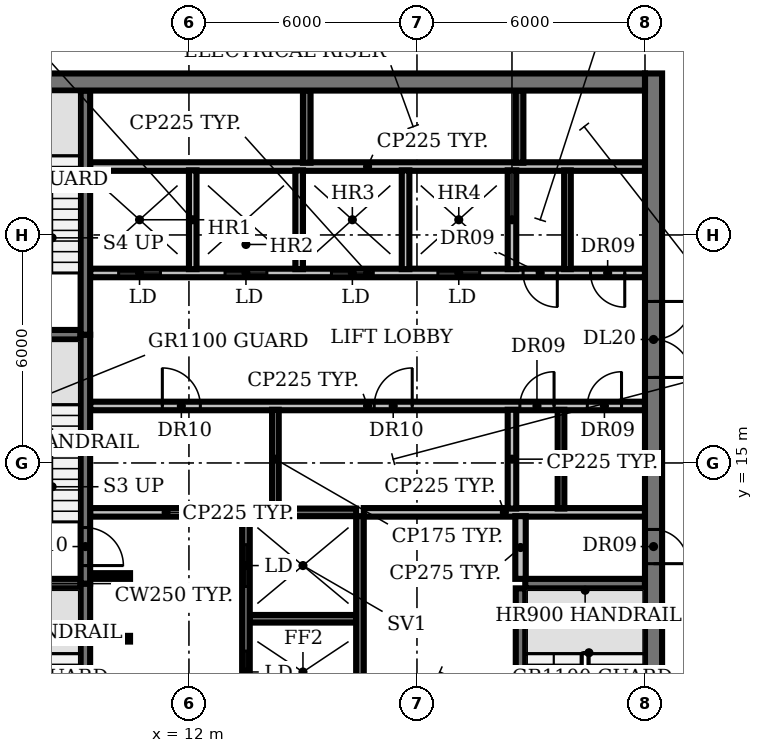
"""IFC4 building model, lengths in metres.
Left out: names, types, materials, properties, quantities, classifications, styles, units other than length and angle.
Written with IfcOpenShell. Run it as: python <this file> out.ifc"""

import sys

from ifc_helpers import new_model, si_unit, direction, frame, frame_2d, origin, place, context, subcontext, project, spatial, rectangle, extrude, element, fill, save


model = new_model("IFC4")
c1 = context("Model", 3, precision=1e-05, world=origin(), true_north=direction((0.0, 1.0)))
c2 = subcontext(c1, "Body", "Model", "MODEL_VIEW")
j1 = project(units=[si_unit("LENGTHUNIT", "METRE"), si_unit("PLANEANGLEUNIT", "RADIAN")], contexts=[c1])
p1 = place(None, origin())
s1 = spatial("IfcSite", under=j1, at=p1, CompositionType="ELEMENT")
p2 = place(p1, origin())
s2 = spatial("IfcBuilding", under=s1, at=p2, CompositionType="ELEMENT")
p3 = place(p2, frame((0.0, 0.0, 222.2)))
s3 = spatial("IfcBuildingStorey", under=s2, at=p3, CompositionType="ELEMENT", Elevation=222.2)
p4 = place(p3, frame((9.4, 10.375, 0.0), z_axis=(0.0, 0.0, 1.0), x_axis=(1.0, 0.0, 0.0)))
e1 = element("IfcWall", 1, at=p4, inside=s3, PredefinedType="SHEAR", context=c2, shape_type="SweptSolid", body=[
    extrude(rectangle(XDim=1.05, YDim=0.15, at=frame_2d((0.525, 0.0))), origin(), (0.0, 0.0, 1.0), 3.85),
])
p5 = place(p3, frame((13.6, 10.9, 0.0), z_axis=(0.0, 0.0, 1.0), x_axis=(1.0, 0.0, 0.0)))
e2 = element("IfcWall", 2, at=p5, inside=s3, PredefinedType="SHEAR", context=c2, shape_type="SweptSolid", body=[
    extrude(rectangle(XDim=2.8, YDim=0.2, at=frame_2d((1.4, 0.0))), origin(), (0.0, 0.0, 1.0), 3.85),
])
for number, where, z_axis, x_axis in (
    (3, (6.0, 11.825, 0.0), (0.0, 0.0, 1.0), (1.0, 0.0, 0.0)),
    (4, (20.85, 11.825, 0.0), (0.0, 0.0, 1.0), (1.0, 0.0, 0.0)),
):
    element("IfcWall", number, at=place(p3, frame(where, z_axis=z_axis, x_axis=x_axis)), inside=s3, PredefinedType="SHEAR", context=c2, shape_type="SweptSolid", body=[
        extrude(rectangle(XDim=3.15, YDim=0.25, at=frame_2d((1.575, 0.0))), origin(), (0.0, 0.0, 1.0), 3.85),
    ])
p6 = place(p3, frame((9.4, 12.025, 0.0), z_axis=(0.0, 0.0, 1.0), x_axis=(1.0, 0.0, 0.0)))
e5 = element("IfcWall", 5, at=p6, inside=s3, PredefinedType="SHEAR", context=c2, shape_type="SweptSolid", body=[
    extrude(rectangle(XDim=1.05, YDim=0.15, at=frame_2d((0.525, 0.0))), origin(), (0.0, 0.0, 1.0), 3.85),
])
p7 = place(p3, frame((9.4, 13.7, 0.0), z_axis=(0.0, 0.0, 1.0), x_axis=(1.0, 0.0, 0.0)))
e6 = element("IfcWall", 6, at=p7, inside=s3, PredefinedType="PARTITIONING", context=c2, shape_type="SweptSolid", body=[
    extrude(rectangle(XDim=4.0, YDim=0.225, at=frame_2d((2.0, 0.0))), origin(), (0.0, 0.0, 1.0), 3.85),
])
p8 = place(p3, frame((13.6, 13.7, 0.0), z_axis=(0.0, 0.0, 1.0), x_axis=(1.0, 0.0, 0.0)))
e7 = element("IfcWall", 7, at=p8, inside=s3, PredefinedType="SHEAR", context=c2, shape_type="SweptSolid", body=[
    extrude(rectangle(XDim=2.8, YDim=0.2, at=frame_2d((1.4, 0.0))), origin(), (0.0, 0.0, 1.0), 3.85),
])
p9 = place(p3, frame((16.6, 13.7, 0.0), z_axis=(0.0, 0.0, 1.0), x_axis=(1.0, 0.0, 0.0)))
e8 = element("IfcWall", 8, at=p9, inside=s3, PredefinedType="PARTITIONING", context=c2, shape_type="SweptSolid", body=[
    extrude(rectangle(XDim=7.4, YDim=0.225, at=frame_2d((3.7, 0.0))), origin(), (0.0, 0.0, 1.0), 3.85),
])
p10 = place(p3, frame((9.4, 16.5, 0.0), z_axis=(0.0, 0.0, 1.0), x_axis=(1.0, 0.0, 0.0)))
e9 = element("IfcWall", 9, at=p10, inside=s3, PredefinedType="PARTITIONING", context=c2, shape_type="SweptSolid", body=[
    extrude(rectangle(XDim=14.6, YDim=0.225, at=frame_2d((7.3, 0.0))), origin(), (0.0, 0.0, 1.0), 3.85),
])
p11 = place(p10, frame((1.9, 0.0, 0.0)))
e10 = element("IfcOpeningElement", 10, at=p11, cuts=e9, PredefinedType="OPENING", context=c2, shape_type="SweptSolid", body=[
    extrude(rectangle(XDim=1.0, YDim=2.1, at=frame_2d((0.5, 1.05))), frame((0.0, 0.123, 0.0), z_axis=(0.0, -1.0, 0.0), x_axis=(1.0, 0.0, 0.0)), (0.0, 0.0, 1.0), 0.245),
])
p12 = place(p10, frame((7.475, 0.0, 0.0)))
e11 = element("IfcOpeningElement", 11, at=p12, cuts=e9, PredefinedType="OPENING", context=c2, shape_type="SweptSolid", body=[
    extrude(rectangle(XDim=1.0, YDim=2.1, at=frame_2d((0.5, 1.05))), frame((0.0, 0.123, 0.0), z_axis=(0.0, -1.0, 0.0), x_axis=(1.0, 0.0, 0.0)), (0.0, 0.0, 1.0), 0.245),
])
p13 = place(p10, frame((11.308, 0.0, 0.0)))
e12 = element("IfcOpeningElement", 12, at=p13, cuts=e9, PredefinedType="OPENING", context=c2, shape_type="SweptSolid", body=[
    extrude(rectangle(XDim=0.9, YDim=2.1, at=frame_2d((0.45, 1.05))), frame((0.0, 0.123, 0.0), z_axis=(0.0, -1.0, 0.0), x_axis=(1.0, 0.0, 0.0)), (0.0, 0.0, 1.0), 0.245),
])
p14 = place(p10, frame((13.083, 0.0, 0.0)))
e13 = element("IfcOpeningElement", 13, at=p14, cuts=e9, PredefinedType="OPENING", context=c2, shape_type="SweptSolid", body=[
    extrude(rectangle(XDim=0.9, YDim=2.1, at=frame_2d((0.45, 1.05))), frame((0.0, 0.123, 0.0), z_axis=(0.0, -1.0, 0.0), x_axis=(1.0, 0.0, 0.0)), (0.0, 0.0, 1.0), 0.245),
])
p15 = place(p3, frame((6.0, 18.375, 0.0), z_axis=(0.0, 0.0, 1.0), x_axis=(1.0, 0.0, 0.0)))
e14 = element("IfcWall", 14, at=p15, inside=s3, PredefinedType="SHEAR", context=c2, shape_type="SweptSolid", body=[
    extrude(rectangle(XDim=3.15, YDim=0.25, at=frame_2d((1.575, 0.0))), origin(), (0.0, 0.0, 1.0), 3.85),
])
p16 = place(p3, frame((24.0, 20.0, 0.0), z_axis=(0.0, 0.0, 1.0), x_axis=(-1.0, 0.0, 0.0)))
e15 = element("IfcWall", 15, at=p16, inside=s3, PredefinedType="PARTITIONING", context=c2, shape_type="SweptSolid", body=[
    extrude(rectangle(XDim=14.6, YDim=0.225, at=frame_2d((7.3, 0.0))), origin(), (0.0, 0.0, 1.0), 3.85),
])
p17 = place(p16, frame((12.75, 0.0, 0.0)))
e16 = element("IfcOpeningElement", 16, at=p17, cuts=e15, PredefinedType="OPENING", context=c2, shape_type="SweptSolid", body=[
    extrude(rectangle(XDim=1.1, YDim=2.1, at=frame_2d((0.55, 1.05))), frame((0.0, 0.123, 0.0), z_axis=(0.0, -1.0, 0.0), x_axis=(1.0, 0.0, 0.0)), (0.0, 0.0, 1.0), 0.245),
])
p18 = place(p16, frame((9.95, 0.0, 0.0)))
e17 = element("IfcOpeningElement", 17, at=p18, cuts=e15, PredefinedType="OPENING", context=c2, shape_type="SweptSolid", body=[
    extrude(rectangle(XDim=1.1, YDim=2.1, at=frame_2d((0.55, 1.05))), frame((0.0, 0.123, 0.0), z_axis=(0.0, -1.0, 0.0), x_axis=(1.0, 0.0, 0.0)), (0.0, 0.0, 1.0), 0.245),
])
p19 = place(p16, frame((7.15, 0.0, 0.0)))
e18 = element("IfcOpeningElement", 18, at=p19, cuts=e15, PredefinedType="OPENING", context=c2, shape_type="SweptSolid", body=[
    extrude(rectangle(XDim=1.1, YDim=2.1, at=frame_2d((0.55, 1.05))), frame((0.0, 0.123, 0.0), z_axis=(0.0, -1.0, 0.0), x_axis=(1.0, 0.0, 0.0)), (0.0, 0.0, 1.0), 0.245),
])
p20 = place(p16, frame((4.35, 0.0, 0.0)))
e19 = element("IfcOpeningElement", 19, at=p20, cuts=e15, PredefinedType="OPENING", context=c2, shape_type="SweptSolid", body=[
    extrude(rectangle(XDim=1.1, YDim=2.1, at=frame_2d((0.55, 1.05))), frame((0.0, 0.123, 0.0), z_axis=(0.0, -1.0, 0.0), x_axis=(1.0, 0.0, 0.0)), (0.0, 0.0, 1.0), 0.245),
])
p21 = place(p16, frame((2.308, 0.0, 0.0)))
e20 = element("IfcOpeningElement", 20, at=p21, cuts=e15, PredefinedType="OPENING", context=c2, shape_type="SweptSolid", body=[
    extrude(rectangle(XDim=0.9, YDim=2.1, at=frame_2d((0.45, 1.05))), frame((0.0, 0.123, 0.0), z_axis=(0.0, -1.0, 0.0), x_axis=(1.0, 0.0, 0.0)), (0.0, 0.0, 1.0), 0.245),
])
p22 = place(p16, frame((0.532, 0.0, 0.0)))
e21 = element("IfcOpeningElement", 21, at=p22, cuts=e15, PredefinedType="OPENING", context=c2, shape_type="SweptSolid", body=[
    extrude(rectangle(XDim=0.9, YDim=2.1, at=frame_2d((0.45, 1.05))), frame((0.0, 0.123, 0.0), z_axis=(0.0, -1.0, 0.0), x_axis=(1.0, 0.0, 0.0)), (0.0, 0.0, 1.0), 0.245),
])
p23 = place(p3, frame((9.4, 22.8, 0.0), z_axis=(0.0, 0.0, 1.0), x_axis=(1.0, 0.0, 0.0)))
e22 = element("IfcWall", 22, at=p23, inside=s3, PredefinedType="PARTITIONING", context=c2, shape_type="SweptSolid", body=[
    extrude(rectangle(XDim=14.6, YDim=0.225, at=frame_2d((7.3, 0.0))), origin(), (0.0, 0.0, 1.0), 3.85),
])
p24 = place(p3, frame((9.275, 11.825, 0.0), z_axis=(0.0, 0.0, 1.0), x_axis=(0.0, -1.0, 0.0)))
e23 = element("IfcWall", 23, at=p24, inside=s3, PredefinedType="SHEAR", context=c2, shape_type="SweptSolid", body=[
    extrude(rectangle(XDim=6.425, YDim=0.25, at=frame_2d((3.212, 0.0))), origin(), (0.0, 0.0, 1.0), 3.85),
])
p25 = place(p24, frame((5.075, 0.0, 0.0)))
e24 = element("IfcOpeningElement", 24, at=p25, cuts=e23, PredefinedType="OPENING", context=c2, shape_type="SweptSolid", body=[
    extrude(rectangle(XDim=1.0, YDim=2.1, at=frame_2d((0.5, 1.05))), frame((0.0, 0.135, 0.0), z_axis=(0.0, -1.0, 0.0), x_axis=(1.0, 0.0, 0.0)), (0.0, 0.0, 1.0), 0.27),
])
p26 = place(p3, frame((9.275, 18.375, 0.0), z_axis=(0.0, 0.0, 1.0), x_axis=(0.0, -1.0, 0.0)))
e25 = element("IfcWall", 25, at=p26, inside=s3, PredefinedType="SHEAR", context=c2, shape_type="SweptSolid", body=[
    extrude(rectangle(XDim=6.55, YDim=0.25, at=frame_2d((3.275, 0.0))), origin(), (0.0, 0.0, 1.0), 3.85),
])
p27 = place(p26, frame((5.075, 0.0, 0.0)))
e26 = element("IfcOpeningElement", 26, at=p27, cuts=e25, PredefinedType="OPENING", context=c2, shape_type="SweptSolid", body=[
    extrude(rectangle(XDim=1.0, YDim=2.1, at=frame_2d((0.5, 1.05))), frame((0.0, 0.135, 0.0), z_axis=(0.0, -1.0, 0.0), x_axis=(1.0, 0.0, 0.0)), (0.0, 0.0, 1.0), 0.27),
])
p28 = place(p3, frame((9.275, 18.375, 0.0), z_axis=(0.0, 0.0, 1.0), x_axis=(0.0, 1.0, 0.0)))
e27 = element("IfcWall", 27, at=p28, inside=s3, PredefinedType="SHEAR", context=c2, shape_type="SweptSolid", body=[
    extrude(rectangle(XDim=6.425, YDim=0.25, at=frame_2d((3.212, 0.0))), origin(), (0.0, 0.0, 1.0), 3.85),
])
p29 = place(p3, frame((12.1, 20.1, 0.0), z_axis=(0.0, 0.0, 1.0), x_axis=(0.0, 1.0, 0.0)))
e28 = element("IfcWall", 28, at=p29, inside=s3, PredefinedType="SOLIDWALL", context=c2, shape_type="SweptSolid", body=[
    extrude(rectangle(XDim=2.6, YDim=0.2, at=frame_2d((1.3, 0.0))), origin(), (0.0, 0.0, 1.0), 3.85),
])
p30 = place(p3, frame((13.5, 5.4, 0.0), z_axis=(0.0, 0.0, 1.0), x_axis=(0.0, 1.0, 0.0)))
e29 = element("IfcWall", 29, at=p30, inside=s3, PredefinedType="SHEAR", context=c2, shape_type="SweptSolid", body=[
    extrude(rectangle(XDim=8.2, YDim=0.2, at=frame_2d((4.1, 0.0))), origin(), (0.0, 0.0, 1.0), 3.85),
])
p31 = place(p30, frame((0.75, 0.0, 0.0)))
e30 = element("IfcOpeningElement", 30, at=p31, cuts=e29, PredefinedType="OPENING", context=c2, shape_type="SweptSolid", body=[
    extrude(rectangle(XDim=1.1, YDim=2.1, at=frame_2d((0.55, 1.05))), frame((0.0, 0.11, 0.0), z_axis=(0.0, -1.0, 0.0), x_axis=(1.0, 0.0, 0.0)), (0.0, 0.0, 1.0), 0.22),
])
p32 = place(p30, frame((3.55, 0.0, 0.0)))
e31 = element("IfcOpeningElement", 31, at=p32, cuts=e29, PredefinedType="OPENING", context=c2, shape_type="SweptSolid", body=[
    extrude(rectangle(XDim=1.1, YDim=2.1, at=frame_2d((0.55, 1.05))), frame((0.0, 0.11, 0.0), z_axis=(0.0, -1.0, 0.0), x_axis=(1.0, 0.0, 0.0)), (0.0, 0.0, 1.0), 0.22),
])
p33 = place(p30, frame((6.35, 0.0, 0.0)))
e32 = element("IfcOpeningElement", 32, at=p33, cuts=e29, PredefinedType="OPENING", context=c2, shape_type="SweptSolid", body=[
    extrude(rectangle(XDim=1.1, YDim=2.1, at=frame_2d((0.55, 1.05))), frame((0.0, 0.11, 0.0), z_axis=(0.0, -1.0, 0.0), x_axis=(1.0, 0.0, 0.0)), (0.0, 0.0, 1.0), 0.22),
])
p34 = place(p3, frame((14.275, 13.8, 0.0), z_axis=(0.0, 0.0, 1.0), x_axis=(0.0, 1.0, 0.0)))
e33 = element("IfcWall", 33, at=p34, inside=s3, PredefinedType="PARTITIONING", context=c2, shape_type="SweptSolid", body=[
    extrude(rectangle(XDim=2.6, YDim=0.175, at=frame_2d((1.3, 0.0))), origin(), (0.0, 0.0, 1.0), 3.85),
])
p35 = place(p3, frame((14.9, 20.1, 0.0), z_axis=(0.0, 0.0, 1.0), x_axis=(0.0, 1.0, 0.0)))
e34 = element("IfcWall", 34, at=p35, inside=s3, PredefinedType="SOLIDWALL", context=c2, shape_type="SweptSolid", body=[
    extrude(rectangle(XDim=2.6, YDim=0.2, at=frame_2d((1.3, 0.0))), origin(), (0.0, 0.0, 1.0), 3.85),
])
p36 = place(p3, frame((15.1, 22.9, 0.0), z_axis=(0.0, 0.0, 1.0), x_axis=(0.0, 1.0, 0.0)))
e35 = element("IfcWall", 35, at=p36, inside=s3, PredefinedType="SHEAR", context=c2, shape_type="SweptSolid", body=[
    extrude(rectangle(XDim=1.9, YDim=0.2, at=frame_2d((0.95, 0.0))), origin(), (0.0, 0.0, 1.0), 3.85),
])
p37 = place(p3, frame((16.5, 5.4, 0.0), z_axis=(0.0, 0.0, 1.0), x_axis=(0.0, 1.0, 0.0)))
e36 = element("IfcWall", 36, at=p37, inside=s3, PredefinedType="SHEAR", context=c2, shape_type="SweptSolid", body=[
    extrude(rectangle(XDim=8.2, YDim=0.2, at=frame_2d((4.1, 0.0))), origin(), (0.0, 0.0, 1.0), 3.85),
])
p38 = place(p3, frame((17.7, 20.1, 0.0), z_axis=(0.0, 0.0, 1.0), x_axis=(0.0, 1.0, 0.0)))
e37 = element("IfcWall", 37, at=p38, inside=s3, PredefinedType="SOLIDWALL", context=c2, shape_type="SweptSolid", body=[
    extrude(rectangle(XDim=2.6, YDim=0.2, at=frame_2d((1.3, 0.0))), origin(), (0.0, 0.0, 1.0), 3.85),
])
for number, where, z_axis, x_axis in (
    (38, (20.5, 13.8, 0.0), (0.0, 0.0, 1.0), (0.0, 1.0, 0.0)),
    (39, (20.5, 20.1, 0.0), (0.0, 0.0, 1.0), (0.0, 1.0, 0.0)),
):
    element("IfcWall", number, at=place(p3, frame(where, z_axis=z_axis, x_axis=x_axis)), inside=s3, PredefinedType="PARTITIONING", context=c2, shape_type="SweptSolid", body=[
        extrude(rectangle(XDim=2.6, YDim=0.225, at=frame_2d((1.3, 0.0))), origin(), (0.0, 0.0, 1.0), 3.85),
    ])
p39 = place(p3, frame((20.7, 22.9, 0.0), z_axis=(0.0, 0.0, 1.0), x_axis=(0.0, 1.0, 0.0)))
e40 = element("IfcWall", 40, at=p39, inside=s3, PredefinedType="SHEAR", context=c2, shape_type="SweptSolid", body=[
    extrude(rectangle(XDim=1.9, YDim=0.2, at=frame_2d((0.95, 0.0))), origin(), (0.0, 0.0, 1.0), 3.85),
])
p40 = place(p3, frame((20.725, 5.4, 0.0), z_axis=(0.0, 0.0, 1.0), x_axis=(0.0, 1.0, 0.0)))
e41 = element("IfcWall", 41, at=p40, inside=s3, PredefinedType="SHEAR", context=c2, shape_type="SweptSolid", body=[
    extrude(rectangle(XDim=6.3, YDim=0.25, at=frame_2d((3.15, 0.0))), origin(), (0.0, 0.0, 1.0), 3.85),
])
p41 = place(p3, frame((20.725, 11.95, 0.0), z_axis=(0.0, 0.0, 1.0), x_axis=(0.0, 1.0, 0.0)))
e42 = element("IfcWall", 42, at=p41, inside=s3, PredefinedType="PARTITIONING", context=c2, shape_type="SweptSolid", body=[
    extrude(rectangle(XDim=1.65, YDim=0.275, at=frame_2d((0.825, 0.0))), origin(), (0.0, 0.0, 1.0), 3.85),
])
for number, where, z_axis, x_axis in (
    (43, (21.79, 13.8, 0.0), (0.0, 0.0, 1.0), (0.0, 1.0, 0.0)),
    (44, (21.96, 20.1, 0.0), (0.0, 0.0, 1.0), (0.0, 1.0, 0.0)),
):
    element("IfcWall", number, at=place(p3, frame(where, z_axis=z_axis, x_axis=x_axis)), inside=s3, PredefinedType="PARTITIONING", context=c2, shape_type="SweptSolid", body=[
        extrude(rectangle(XDim=2.6, YDim=0.175, at=frame_2d((1.3, 0.0))), origin(), (0.0, 0.0, 1.0), 3.85),
    ])
p42 = place(p3, frame((24.225, 25.25, 0.0), z_axis=(0.0, 0.0, 1.0), x_axis=(0.0, -1.0, 0.0)))
e45 = element("IfcWall", 45, at=p42, inside=s3, PredefinedType="SHEAR", context=c2, shape_type="SweptSolid", body=[
    extrude(rectangle(XDim=20.83, YDim=0.45, at=frame_2d((10.415, 0.0))), origin(), (0.0, 0.0, 1.0), 3.85),
])
p43 = place(p42, frame((18.1, 0.0, 0.0)))
e46 = element("IfcOpeningElement", 46, at=p43, cuts=e45, PredefinedType="OPENING", context=c2, shape_type="SweptSolid", body=[
    extrude(rectangle(XDim=1.5, YDim=2.1, at=frame_2d((0.75, 1.05))), frame((0.0, 0.235, 0.0), z_axis=(0.0, -1.0, 0.0), x_axis=(1.0, 0.0, 0.0)), (0.0, 0.0, 1.0), 0.47),
])
p44 = place(p42, frame((12.0, 0.0, 0.0)))
e47 = element("IfcOpeningElement", 47, at=p44, cuts=e45, PredefinedType="OPENING", context=c2, shape_type="SweptSolid", body=[
    extrude(rectangle(XDim=0.9, YDim=2.1, at=frame_2d((0.45, 1.05))), frame((0.0, 0.235, 0.0), z_axis=(0.0, -1.0, 0.0), x_axis=(1.0, 0.0, 0.0)), (0.0, 0.0, 1.0), 0.47),
])
p45 = place(p42, frame((6.0, 0.0, 0.0)))
e48 = element("IfcOpeningElement", 48, at=p45, cuts=e45, PredefinedType="OPENING", context=c2, shape_type="SweptSolid", body=[
    extrude(rectangle(XDim=2.0, YDim=2.1, at=frame_2d((1.0, 1.05))), frame((0.0, 0.235, 0.0), z_axis=(0.0, -1.0, 0.0), x_axis=(1.0, 0.0, 0.0)), (0.0, 0.0, 1.0), 0.47),
])
p46 = place(p3, frame((6.0, 25.025, 0.0), z_axis=(0.0, 0.0, 1.0), x_axis=(1.0, 0.0, 0.0)))
e49 = element("IfcWall", 49, at=p46, inside=s3, PredefinedType="SHEAR", context=c2, shape_type="SweptSolid", body=[
    extrude(rectangle(XDim=18.0, YDim=0.45, at=frame_2d((9.0, 0.0))), origin(), (0.0, 0.0, 1.0), 3.85),
])
p47 = place(p11, origin())
e50 = element("IfcDoor", 50, at=p47, inside=s3, OperationType="SINGLE_SWING_LEFT", PredefinedType="DOOR", context=c2, shape_type="SweptSolid", body=[
    extrude(rectangle(XDim=1.0, YDim=2.1, at=frame_2d((0.5, 1.05))), frame((0.0, 0.025, 0.0), z_axis=(0.0, -1.0, 0.0), x_axis=(1.0, 0.0, 0.0)), (0.0, 0.0, 1.0), 0.05),
])
fill(e10, e50)
p48 = place(p12, origin())
e51 = element("IfcDoor", 51, at=p48, inside=s3, OperationType="SINGLE_SWING_RIGHT", PredefinedType="DOOR", context=c2, shape_type="SweptSolid", body=[
    extrude(rectangle(XDim=1.0, YDim=2.1, at=frame_2d((0.5, 1.05))), frame((0.0, 0.025, 0.0), z_axis=(0.0, -1.0, 0.0), x_axis=(1.0, 0.0, 0.0)), (0.0, 0.0, 1.0), 0.05),
])
fill(e11, e51)
p49 = place(p13, origin())
e52 = element("IfcDoor", 52, at=p49, inside=s3, OperationType="SINGLE_SWING_RIGHT", PredefinedType="DOOR", context=c2, shape_type="SweptSolid", body=[
    extrude(rectangle(XDim=0.9, YDim=2.1, at=frame_2d((0.45, 1.05))), frame((0.0, 0.025, 0.0), z_axis=(0.0, -1.0, 0.0), x_axis=(1.0, 0.0, 0.0)), (0.0, 0.0, 1.0), 0.05),
])
fill(e12, e52)
p50 = place(p14, origin())
e53 = element("IfcDoor", 53, at=p50, inside=s3, OperationType="SINGLE_SWING_RIGHT", PredefinedType="DOOR", context=c2, shape_type="SweptSolid", body=[
    extrude(rectangle(XDim=0.9, YDim=2.1, at=frame_2d((0.45, 1.05))), frame((0.0, 0.025, 0.0), z_axis=(0.0, -1.0, 0.0), x_axis=(1.0, 0.0, 0.0)), (0.0, 0.0, 1.0), 0.05),
])
fill(e13, e53)
p51 = place(p17, origin())
e54 = element("IfcDoor", 54, at=p51, inside=s3, OperationType="DOUBLE_DOOR_SLIDING", PredefinedType="DOOR", context=c2, shape_type="SweptSolid", body=[
    extrude(rectangle(XDim=1.1, YDim=2.1, at=frame_2d((0.55, 1.05))), frame((0.0, 0.025, 0.0), z_axis=(0.0, -1.0, 0.0), x_axis=(1.0, 0.0, 0.0)), (0.0, 0.0, 1.0), 0.05),
])
fill(e16, e54)
p52 = place(p18, origin())
e55 = element("IfcDoor", 55, at=p52, inside=s3, OperationType="DOUBLE_DOOR_SLIDING", PredefinedType="DOOR", context=c2, shape_type="SweptSolid", body=[
    extrude(rectangle(XDim=1.1, YDim=2.1, at=frame_2d((0.55, 1.05))), frame((0.0, 0.025, 0.0), z_axis=(0.0, -1.0, 0.0), x_axis=(1.0, 0.0, 0.0)), (0.0, 0.0, 1.0), 0.05),
])
fill(e17, e55)
p53 = place(p19, origin())
e56 = element("IfcDoor", 56, at=p53, inside=s3, OperationType="DOUBLE_DOOR_SLIDING", PredefinedType="DOOR", context=c2, shape_type="SweptSolid", body=[
    extrude(rectangle(XDim=1.1, YDim=2.1, at=frame_2d((0.55, 1.05))), frame((0.0, 0.025, 0.0), z_axis=(0.0, -1.0, 0.0), x_axis=(1.0, 0.0, 0.0)), (0.0, 0.0, 1.0), 0.05),
])
fill(e18, e56)
p54 = place(p20, origin())
e57 = element("IfcDoor", 57, at=p54, inside=s3, OperationType="DOUBLE_DOOR_SLIDING", PredefinedType="DOOR", context=c2, shape_type="SweptSolid", body=[
    extrude(rectangle(XDim=1.1, YDim=2.1, at=frame_2d((0.55, 1.05))), frame((0.0, 0.025, 0.0), z_axis=(0.0, -1.0, 0.0), x_axis=(1.0, 0.0, 0.0)), (0.0, 0.0, 1.0), 0.05),
])
fill(e19, e57)
p55 = place(p21, origin())
e58 = element("IfcDoor", 58, at=p55, inside=s3, OperationType="SINGLE_SWING_LEFT", PredefinedType="DOOR", context=c2, shape_type="SweptSolid", body=[
    extrude(rectangle(XDim=0.9, YDim=2.1, at=frame_2d((0.45, 1.05))), frame((0.0, 0.025, 0.0), z_axis=(0.0, -1.0, 0.0), x_axis=(1.0, 0.0, 0.0)), (0.0, 0.0, 1.0), 0.05),
])
fill(e20, e58)
p56 = place(p22, origin())
e59 = element("IfcDoor", 59, at=p56, inside=s3, OperationType="SINGLE_SWING_LEFT", PredefinedType="DOOR", context=c2, shape_type="SweptSolid", body=[
    extrude(rectangle(XDim=0.9, YDim=2.1, at=frame_2d((0.45, 1.05))), frame((0.0, 0.025, 0.0), z_axis=(0.0, -1.0, 0.0), x_axis=(1.0, 0.0, 0.0)), (0.0, 0.0, 1.0), 0.05),
])
fill(e21, e59)
p57 = place(p27, origin())
e60 = element("IfcDoor", 60, at=p57, inside=s3, OperationType="SINGLE_SWING_RIGHT", PredefinedType="DOOR", context=c2, shape_type="SweptSolid", body=[
    extrude(rectangle(XDim=1.0, YDim=2.1, at=frame_2d((0.5, 1.05))), frame((0.0, 0.025, 0.0), z_axis=(0.0, -1.0, 0.0), x_axis=(1.0, 0.0, 0.0)), (0.0, 0.0, 1.0), 0.05),
])
fill(e26, e60)
p58 = place(p32, origin())
e61 = element("IfcDoor", 61, at=p58, inside=s3, OperationType="DOUBLE_DOOR_SLIDING", PredefinedType="DOOR", context=c2, shape_type="SweptSolid", body=[
    extrude(rectangle(XDim=1.1, YDim=2.1, at=frame_2d((0.55, 1.05))), frame((0.0, 0.025, 0.0), z_axis=(0.0, -1.0, 0.0), x_axis=(1.0, 0.0, 0.0)), (0.0, 0.0, 1.0), 0.05),
])
fill(e31, e61)
p59 = place(p33, origin())
e62 = element("IfcDoor", 62, at=p59, inside=s3, OperationType="DOUBLE_DOOR_SLIDING", PredefinedType="DOOR", context=c2, shape_type="SweptSolid", body=[
    extrude(rectangle(XDim=1.1, YDim=2.1, at=frame_2d((0.55, 1.05))), frame((0.0, 0.025, 0.0), z_axis=(0.0, -1.0, 0.0), x_axis=(1.0, 0.0, 0.0)), (0.0, 0.0, 1.0), 0.05),
])
fill(e32, e62)
p60 = place(p44, origin())
e63 = element("IfcDoor", 63, at=p60, inside=s3, OperationType="SINGLE_SWING_RIGHT", PredefinedType="DOOR", context=c2, shape_type="SweptSolid", body=[
    extrude(rectangle(XDim=0.9, YDim=2.1, at=frame_2d((0.45, 1.05))), frame((0.0, 0.025, 0.0), z_axis=(0.0, -1.0, 0.0), x_axis=(1.0, 0.0, 0.0)), (0.0, 0.0, 1.0), 0.05),
])
fill(e47, e63)
p61 = place(p45, origin())
e64 = element("IfcDoor", 64, at=p61, inside=s3, OperationType="DOUBLE_DOOR_SINGLE_SWING", PredefinedType="DOOR", context=c2, shape_type="SweptSolid", body=[
    extrude(rectangle(XDim=2.0, YDim=2.1, at=frame_2d((1.0, 1.05))), frame((0.0, 0.025, 0.0), z_axis=(0.0, -1.0, 0.0), x_axis=(1.0, 0.0, 0.0)), (0.0, 0.0, 1.0), 0.05),
])
fill(e48, e64)
save(model, sys.argv[1])
